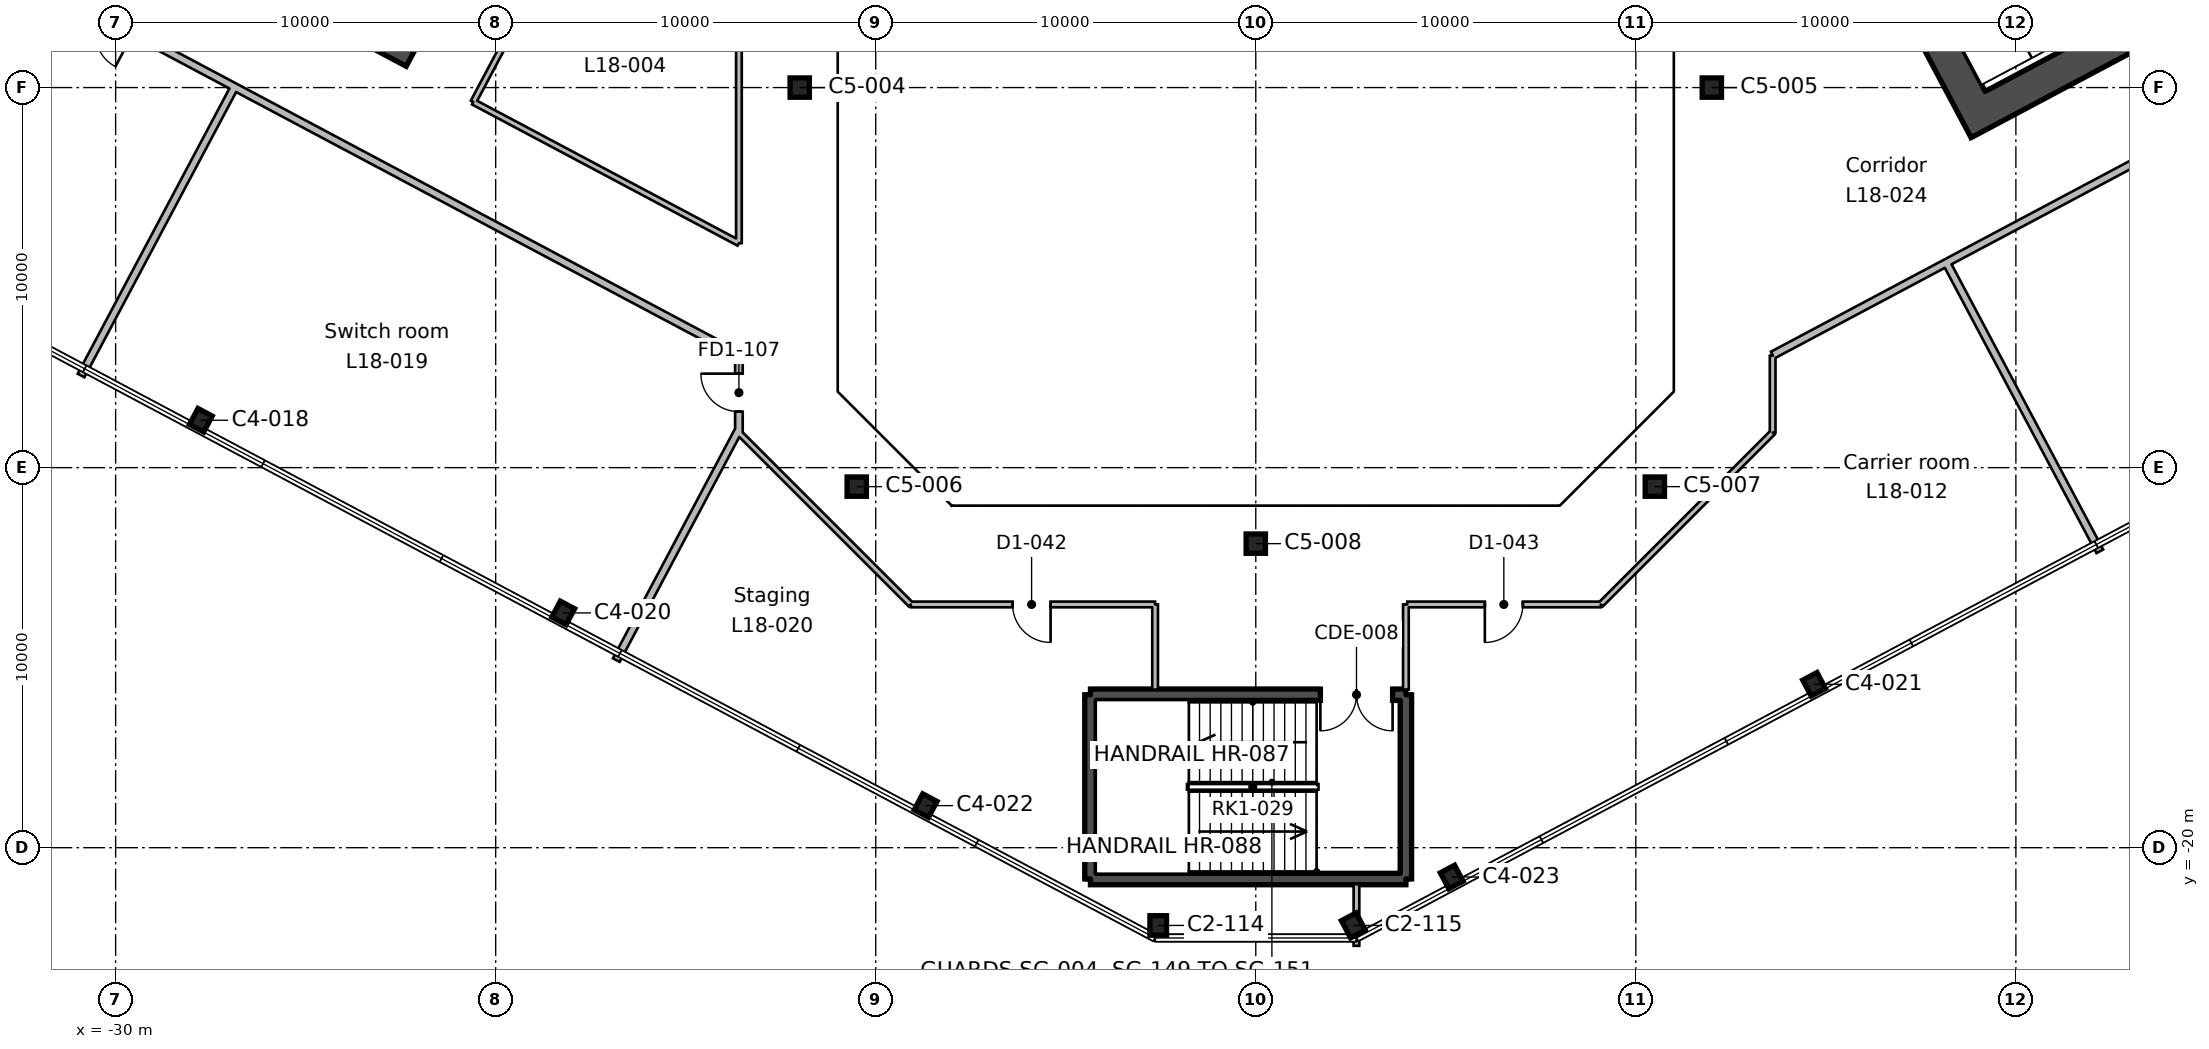
"""IFC4 building model, lengths in metres.
Left out: names, types, materials, properties, quantities, classifications, styles, units other than length and angle.
Written with IfcOpenShell. Run it as: python <this file> out.ifc"""

import sys

from ifc_helpers import new_model, si_unit, direction, frame, frame_2d, origin, origin_2d, place, context, subcontext, project, spatial, rectangle, hollow_rectangle, i_section, extrude, element, fill, save


model = new_model("IFC4")
c1 = context("Model", 3, precision=1e-05, world=origin(), true_north=direction((0.0, 1.0)))
c2 = subcontext(c1, "Body", "Model", "MODEL_VIEW")
j1 = project(units=[si_unit("LENGTHUNIT", "METRE"), si_unit("PLANEANGLEUNIT", "RADIAN")], contexts=[c1])
p1 = place(None, origin())
s1 = spatial("IfcSite", under=j1, at=p1, CompositionType="ELEMENT")
p2 = place(p1, origin())
s2 = spatial("IfcBuilding", under=s1, at=p2, CompositionType="ELEMENT")
p3 = place(p2, frame((0.0, 0.0, 93.8)))
s3 = spatial("IfcBuildingStorey", under=s2, at=p3, CompositionType="ELEMENT", Elevation=93.8)
for number, where, z_axis, x_axis in (
    (1, (-2.567, -22.046, 0.0), (0.0, 0.0, 1.0), (1.0, 0.0, 0.0)),
    (2, (2.567, -22.046, 0.0), (0.0, 0.0, 1.0), (0.883, 0.469, 0.0)),
):
    element("IfcColumn", number, at=place(p3, frame(where, z_axis=z_axis, x_axis=x_axis)), inside=s3, PredefinedType="COLUMN", context=c2, shape_type="SweptSolid", body=[
        extrude(i_section(OverallWidth=0.437, OverallDepth=0.513, WebThickness=0.061, FlangeThickness=0.097, FilletRadius=0.015, at=origin_2d()), origin(), (0.0, 0.0, 1.0), 4.6),
    ])
for number, where, z_axis, x_axis in (
    (3, (5.155, -20.771, 0.0), (0.0, 0.0, 1.0), (0.883, 0.469, 0.0)),
    (4, (-8.687, -18.893, 0.0), (0.0, 0.0, 1.0), (0.883, -0.469, 0.0)),
    (5, (14.691, -15.701, 0.0), (0.0, 0.0, 1.0), (0.883, 0.469, 0.0)),
    (6, (-18.223, -13.823, 0.0), (0.0, 0.0, 1.0), (0.883, -0.469, 0.0)),
):
    element("IfcColumn", number, at=place(p3, frame(where, z_axis=z_axis, x_axis=x_axis)), inside=s3, PredefinedType="COLUMN", context=c2, shape_type="SweptSolid", body=[
        extrude(i_section(OverallWidth=0.424, OverallDepth=0.475, WebThickness=0.048, FlangeThickness=0.077, FilletRadius=0.015, at=origin_2d()), origin(), (0.0, 0.0, 1.0), 4.6),
    ])
for number, where, z_axis, x_axis in (
    (7, (0.0, -12.0, 0.0), (0.0, 0.0, 1.0), (1.0, 0.0, 0.0)),
    (8, (-10.5, -10.5, 0.0), (0.0, 0.0, 1.0), (1.0, 0.0, 0.0)),
    (9, (10.5, -10.5, 0.0), (0.0, 0.0, 1.0), (1.0, 0.0, 0.0)),
):
    element("IfcColumn", number, at=place(p3, frame(where, z_axis=z_axis, x_axis=x_axis)), inside=s3, PredefinedType="COLUMN", context=c2, shape_type="SweptSolid", body=[
        extrude(hollow_rectangle(XDim=0.508, YDim=0.508, WallThickness=0.021, InnerFilletRadius=0.01, OuterFilletRadius=0.031, at=origin_2d()), origin(), (0.0, 0.0, 1.0), 4.6),
    ])
p4 = place(p3, frame((-27.758, -8.753, 0.0), z_axis=(0.0, 0.0, 1.0), x_axis=(0.882947592859, -0.469471562786, 0.0)))
e10 = element("IfcColumn", 10, at=p4, inside=s3, PredefinedType="COLUMN", context=c2, shape_type="SweptSolid", body=[
    extrude(i_section(OverallWidth=0.424, OverallDepth=0.475, WebThickness=0.048, FlangeThickness=0.077, FilletRadius=0.015, at=origin_2d()), origin(), (0.0, 0.0, 1.0), 4.6),
])
for number, where, z_axis, x_axis in (
    (11, (-12.0, 0.0, 0.0), (0.0, 0.0, 1.0), (1.0, 0.0, 0.0)),
    (12, (12.0, 0.0, 0.0), (0.0, 0.0, 1.0), (1.0, 0.0, 0.0)),
):
    element("IfcColumn", number, at=place(p3, frame(where, z_axis=z_axis, x_axis=x_axis)), inside=s3, PredefinedType="COLUMN", context=c2, shape_type="SweptSolid", body=[
        extrude(hollow_rectangle(XDim=0.508, YDim=0.508, WallThickness=0.021, InnerFilletRadius=0.01, OuterFilletRadius=0.031, at=origin_2d()), origin(), (0.0, 0.0, 1.0), 4.6),
    ])
p5 = place(p3, frame((-13.362, 18.43, 0.0), z_axis=(0.0, 0.0, 1.0), x_axis=(-0.46947084998, -0.882947971864, 0.0)))
e13 = element("IfcWall", 13, at=p5, inside=s3, PredefinedType="SHEAR", context=c2, shape_type="SweptSolid", body=[
    extrude(rectangle(XDim=20.0, YDim=0.9, at=frame_2d((10.0, 0.0))), origin(), (0.0, 0.0, 1.0), 4.6),
])
p6 = place(p5, frame((7.0, 0.0, 0.0)))
e14 = element("IfcOpeningElement", 14, at=p6, cuts=e13, PredefinedType="OPENING", context=c2, shape_type="SweptSolid", body=[
    extrude(rectangle(XDim=2.4, YDim=2.4, at=frame_2d((1.2, 1.2))), frame((0.0, 0.46, 0.0), z_axis=(0.0, -1.0, 0.0), x_axis=(1.0, 0.0, 0.0)), (0.0, 0.0, 1.0), 0.92),
])
p7 = place(p3, frame((19.219, -1.107, 0.0), z_axis=(0.0, 0.0, 1.0), x_axis=(-0.46947084998, 0.882947971864, 0.0)))
e15 = element("IfcWall", 15, at=p7, inside=s3, PredefinedType="SHEAR", context=c2, shape_type="SweptSolid", body=[
    extrude(rectangle(XDim=20.0, YDim=0.9, at=frame_2d((10.0, 0.0))), origin(), (0.0, 0.0, 1.0), 4.6),
])
p8 = place(p7, frame((7.0, 0.0, 0.0)))
e16 = element("IfcOpeningElement", 16, at=p8, cuts=e15, PredefinedType="OPENING", context=c2, shape_type="SweptSolid", body=[
    extrude(rectangle(XDim=2.4, YDim=2.4, at=frame_2d((1.2, 1.2))), frame((0.0, 0.46, 0.0), z_axis=(0.0, -1.0, 0.0), x_axis=(1.0, 0.0, 0.0)), (0.0, 0.0, 1.0), 0.92),
])
p9 = place(p3, frame((19.405, -0.498, 0.0), z_axis=(0.0, 0.0, 1.0), x_axis=(0.88294509198, 0.469476266226, 0.0)))
e17 = element("IfcWall", 17, at=p9, inside=s3, PredefinedType="SHEAR", context=c2, shape_type="SweptSolid", body=[
    extrude(rectangle(XDim=20.2, YDim=0.9, at=frame_2d((10.1, 0.0))), origin(), (0.0, 0.0, 1.0), 4.6),
])
p10 = place(p3, frame((3.95, -15.975, 0.0), z_axis=(0.0, 0.0, 1.0), x_axis=(0.0, -1.0, 0.0)))
e18 = element("IfcWall", 18, at=p10, inside=s3, PredefinedType="SHEAR", context=c2, shape_type="SweptSolid", body=[
    extrude(rectangle(XDim=4.85, YDim=0.3, at=frame_2d((2.425, 0.0))), origin(), (0.0, 0.0, 1.0), 4.6),
])
p11 = place(p3, frame((3.95, -20.825, 0.0), z_axis=(0.0, 0.0, 1.0), x_axis=(-1.0, 0.0, 0.0)))
e19 = element("IfcWall", 19, at=p11, inside=s3, PredefinedType="SHEAR", context=c2, shape_type="SweptSolid", body=[
    extrude(rectangle(XDim=8.3, YDim=0.3, at=frame_2d((4.15, 0.0))), origin(), (0.0, 0.0, 1.0), 4.6),
])
p12 = place(p3, frame((-4.35, -20.825, 0.0), z_axis=(0.0, 0.0, 1.0), x_axis=(0.0, 1.0, 0.0)))
e20 = element("IfcWall", 20, at=p12, inside=s3, PredefinedType="SHEAR", context=c2, shape_type="SweptSolid", body=[
    extrude(rectangle(XDim=4.85, YDim=0.3, at=frame_2d((2.425, 0.0))), origin(), (0.0, 0.0, 1.0), 4.6),
])
p13 = place(p3, frame((-4.35, -15.975, 0.0), z_axis=(0.0, 0.0, 1.0), x_axis=(1.0, 0.0, 0.0)))
e21 = element("IfcWall", 21, at=p13, inside=s3, PredefinedType="SHEAR", context=c2, shape_type="SweptSolid", body=[
    extrude(rectangle(XDim=8.3, YDim=0.3, at=frame_2d((4.15, 0.0))), origin(), (0.0, 0.0, 1.0), 4.6),
])
p14 = place(p13, frame((6.05, 0.0, 0.0)))
e22 = element("IfcOpeningElement", 22, at=p14, cuts=e21, PredefinedType="OPENING", context=c2, shape_type="SweptSolid", body=[
    extrude(rectangle(XDim=1.9, YDim=2.1, at=frame_2d((0.95, 1.05))), frame((0.0, 0.16, 0.0), z_axis=(0.0, -1.0, 0.0), x_axis=(1.0, 0.0, 0.0)), (0.0, 0.0, 1.0), 0.32),
])
p15 = place(p3, frame((-26.871, 0.017, 0.0), z_axis=(0.0, 0.0, 1.0), x_axis=(-0.469522575087, -0.882920467247, 0.0)))
e23 = element("IfcWall", 23, at=p15, inside=s3, PredefinedType="PARTITIONING", context=c2, shape_type="SweptSolid", body=[
    extrude(rectangle(XDim=8.6, YDim=0.2, at=frame_2d((4.3, 0.0))), origin(), (0.0, 0.0, 1.0), 4.2),
])
p16 = place(p3, frame((-13.6, -9.077, 0.0), z_axis=(0.0, 0.0, 1.0), x_axis=(0.0, 1.0, 0.0)))
e24 = element("IfcWall", 24, at=p16, inside=s3, PredefinedType="PARTITIONING", context=c2, shape_type="SweptSolid", body=[
    extrude(rectangle(XDim=2.038, YDim=0.2, at=frame_2d((1.019, 0.0))), origin(), (0.0, 0.0, 1.0), 4.2),
])
p17 = place(p16, frame((0.55, 0.0, 0.0)))
e25 = element("IfcOpeningElement", 25, at=p17, cuts=e24, PredefinedType="OPENING", context=c2, shape_type="SweptSolid", body=[
    extrude(rectangle(XDim=1.0, YDim=2.1, at=frame_2d((0.5, 1.05))), frame((0.0, 0.11, 0.0), z_axis=(0.0, -1.0, 0.0), x_axis=(1.0, 0.0, 0.0)), (0.0, 0.0, 1.0), 0.22),
])
p18 = place(p3, frame((-13.6, -7.039, 0.0), z_axis=(0.0, 0.0, 1.0), x_axis=(-0.882948807105, 0.469469279113, 0.0)))
e26 = element("IfcWall", 26, at=p18, inside=s3, PredefinedType="PARTITIONING", context=c2, shape_type="SweptSolid", body=[
    extrude(rectangle(XDim=36.999, YDim=0.2, at=frame_2d((18.499, 0.0))), origin(), (0.0, 0.0, 1.0), 4.2),
])
p19 = place(p18, frame((18.05, 0.0, 0.0)))
e27 = element("IfcOpeningElement", 27, at=p19, cuts=e26, PredefinedType="OPENING", context=c2, shape_type="SweptSolid", body=[
    extrude(rectangle(XDim=1.0, YDim=2.1, at=frame_2d((0.5, 1.05))), frame((0.0, 0.11, 0.0), z_axis=(0.0, -1.0, 0.0), x_axis=(1.0, 0.0, 0.0)), (0.0, 0.0, 1.0), 0.22),
])
p20 = place(p3, frame((-13.6, -8.998, 0.0), z_axis=(0.0, 0.0, 1.0), x_axis=(-0.469531053644, -0.882915958438, 0.0)))
e28 = element("IfcWall", 28, at=p20, inside=s3, PredefinedType="PARTITIONING", context=c2, shape_type="SweptSolid", body=[
    extrude(rectangle(XDim=6.87, YDim=0.2, at=frame_2d((3.435, 0.0))), origin(), (0.0, 0.0, 1.0), 4.2),
])
p21 = place(p3, frame((-13.6, -9.077, 0.0), z_axis=(0.0, 0.0, 1.0), x_axis=(0.707106781187, -0.707106781187, 0.0)))
e29 = element("IfcWall", 29, at=p21, inside=s3, PredefinedType="PARTITIONING", context=c2, shape_type="SweptSolid", body=[
    extrude(rectangle(XDim=6.397, YDim=0.15, at=frame_2d((3.198, 0.0))), origin(), (0.0, 0.0, 1.0), 4.2),
])
p22 = place(p3, frame((-2.649, -15.84, 0.0), z_axis=(0.0, 0.0, 1.0), x_axis=(0.0, 1.0, 0.0)))
e30 = element("IfcWall", 30, at=p22, inside=s3, PredefinedType="PARTITIONING", context=c2, shape_type="SweptSolid", body=[
    extrude(rectangle(XDim=2.24, YDim=0.15, at=frame_2d((1.12, 0.0))), origin(), (0.0, 0.0, 1.0), 4.2),
])
p23 = place(p3, frame((-2.649, -13.6, 0.0), z_axis=(0.0, 0.0, 1.0), x_axis=(-1.0, 0.0, 0.0)))
e31 = element("IfcWall", 31, at=p23, inside=s3, PredefinedType="PARTITIONING", context=c2, shape_type="SweptSolid", body=[
    extrude(rectangle(XDim=6.428, YDim=0.15, at=frame_2d((3.214, 0.0))), origin(), (0.0, 0.0, 1.0), 4.2),
])
p24 = place(p23, frame((2.75, 0.0, 0.0)))
e32 = element("IfcOpeningElement", 32, at=p24, cuts=e31, PredefinedType="OPENING", context=c2, shape_type="SweptSolid", body=[
    extrude(rectangle(XDim=1.0, YDim=2.1, at=frame_2d((0.5, 1.05))), frame((0.0, 0.085, 0.0), z_axis=(0.0, -1.0, 0.0), x_axis=(1.0, 0.0, 0.0)), (0.0, 0.0, 1.0), 0.17),
])
p25 = place(p3, frame((2.649, -22.582, 0.0), z_axis=(0.0, 0.0, 1.0), x_axis=(0.0, 1.0, 0.0)))
e33 = element("IfcWall", 33, at=p25, inside=s3, PredefinedType="PARTITIONING", context=c2, shape_type="SweptSolid", body=[
    extrude(rectangle(XDim=1.622, YDim=0.15, at=frame_2d((0.811, 0.0))), origin(), (0.0, 0.0, 1.0), 4.2),
])
p26 = place(p3, frame((3.95, -13.6, 0.0), z_axis=(0.0, 0.0, 1.0), x_axis=(0.0, -1.0, 0.0)))
e34 = element("IfcWall", 34, at=p26, inside=s3, PredefinedType="PARTITIONING", context=c2, shape_type="SweptSolid", body=[
    extrude(rectangle(XDim=2.24, YDim=0.15, at=frame_2d((1.12, 0.0))), origin(), (0.0, 0.0, 1.0), 4.2),
])
p27 = place(p3, frame((13.6, -7.053, 0.0), z_axis=(0.0, 0.0, 1.0), x_axis=(0.0, -1.0, 0.0)))
e35 = element("IfcWall", 35, at=p27, inside=s3, PredefinedType="PARTITIONING", context=c2, shape_type="SweptSolid", body=[
    extrude(rectangle(XDim=2.024, YDim=0.15, at=frame_2d((1.012, 0.0))), origin(), (0.0, 0.0, 1.0), 4.2),
])
p28 = place(p3, frame((13.6, -9.077, 0.0), z_axis=(0.0, 0.0, 1.0), x_axis=(-0.707106781187, -0.707106781187, 0.0)))
e36 = element("IfcWall", 36, at=p28, inside=s3, PredefinedType="PARTITIONING", context=c2, shape_type="SweptSolid", body=[
    extrude(rectangle(XDim=6.397, YDim=0.15, at=frame_2d((3.198, 0.0))), origin(), (0.0, 0.0, 1.0), 4.2),
])
p29 = place(p3, frame((9.077, -13.6, 0.0), z_axis=(0.0, 0.0, 1.0), x_axis=(-1.0, 0.0, 0.0)))
e37 = element("IfcWall", 37, at=p29, inside=s3, PredefinedType="PARTITIONING", context=c2, shape_type="SweptSolid", body=[
    extrude(rectangle(XDim=5.092, YDim=0.15, at=frame_2d((2.546, 0.0))), origin(), (0.0, 0.0, 1.0), 4.2),
])
p30 = place(p29, frame((2.05, 0.0, 0.0)))
e38 = element("IfcOpeningElement", 38, at=p30, cuts=e37, PredefinedType="OPENING", context=c2, shape_type="SweptSolid", body=[
    extrude(rectangle(XDim=1.0, YDim=2.1, at=frame_2d((0.5, 1.05))), frame((0.0, 0.085, 0.0), z_axis=(0.0, -1.0, 0.0), x_axis=(1.0, 0.0, 0.0)), (0.0, 0.0, 1.0), 0.17),
])
p31 = place(p3, frame((18.172, -4.608, 0.0), z_axis=(0.0, 0.0, 1.0), x_axis=(0.469386979633, -0.882992561323, 0.0)))
e39 = element("IfcWall", 39, at=p31, inside=s3, PredefinedType="PARTITIONING", context=c2, shape_type="SweptSolid", body=[
    extrude(rectangle(XDim=8.6, YDim=0.2, at=frame_2d((4.3, 0.0))), origin(), (0.0, 0.0, 1.0), 4.2),
])
p32 = place(p3, frame((57.105, 16.093, 0.0), z_axis=(0.0, 0.0, 1.0), x_axis=(-0.882946553343, -0.469473517827, 0.0)))
e40 = element("IfcWall", 40, at=p32, inside=s3, PredefinedType="PARTITIONING", context=c2, shape_type="SweptSolid", body=[
    extrude(rectangle(XDim=49.272, YDim=0.2, at=frame_2d((24.636, 0.0))), origin(), (0.0, 0.0, 1.0), 4.2),
])
p33 = place(p32, frame((27.75, 0.0, 0.0)))
e41 = element("IfcOpeningElement", 41, at=p33, cuts=e40, PredefinedType="OPENING", context=c2, shape_type="SweptSolid", body=[
    extrude(rectangle(XDim=1.0, YDim=2.1, at=frame_2d((0.5, 1.05))), frame((0.0, 0.11, 0.0), z_axis=(0.0, -1.0, 0.0), x_axis=(1.0, 0.0, 0.0)), (0.0, 0.0, 1.0), 0.22),
])
p34 = place(p32, frame((24.15, 0.0, 0.0)))
e42 = element("IfcOpeningElement", 42, at=p34, cuts=e40, PredefinedType="OPENING", context=c2, shape_type="SweptSolid", body=[
    extrude(rectangle(XDim=1.0, YDim=2.1, at=frame_2d((0.5, 1.05))), frame((0.0, 0.11, 0.0), z_axis=(0.0, -1.0, 0.0), x_axis=(1.0, 0.0, 0.0)), (0.0, 0.0, 1.0), 0.22),
])
p35 = place(p32, frame((9.85, 0.0, 0.0)))
e43 = element("IfcOpeningElement", 43, at=p35, cuts=e40, PredefinedType="OPENING", context=c2, shape_type="SweptSolid", body=[
    extrude(rectangle(XDim=1.0, YDim=2.1, at=frame_2d((0.5, 1.05))), frame((0.0, 0.11, 0.0), z_axis=(0.0, -1.0, 0.0), x_axis=(1.0, 0.0, 0.0)), (0.0, 0.0, 1.0), 0.22),
])
p36 = place(p3, frame((-20.588, -0.379, 0.0), z_axis=(0.0, 0.0, 1.0), x_axis=(0.469489882812, 0.882937851685, 0.0)))
e44 = element("IfcWall", 44, at=p36, inside=s3, PredefinedType="PARTITIONING", context=c2, shape_type="SweptSolid", body=[
    extrude(rectangle(XDim=20.0, YDim=0.15, at=frame_2d((10.0, 0.0))), origin(), (0.0, 0.0, 1.0), 4.2),
])
p37 = place(p36, frame((9.55, 0.0, 0.0)))
e45 = element("IfcOpeningElement", 45, at=p37, cuts=e44, PredefinedType="OPENING", context=c2, shape_type="SweptSolid", body=[
    extrude(rectangle(XDim=1.0, YDim=2.1, at=frame_2d((0.5, 1.05))), frame((0.0, 0.085, 0.0), z_axis=(0.0, -1.0, 0.0), x_axis=(1.0, 0.0, 0.0)), (0.0, 0.0, 1.0), 0.17),
])
p38 = place(p3, frame((-13.6, 9.077, 0.0), z_axis=(0.0, 0.0, 1.0), x_axis=(0.0, -1.0, 0.0)))
e46 = element("IfcWall", 46, at=p38, inside=s3, PredefinedType="PARTITIONING", context=c2, shape_type="SweptSolid", body=[
    extrude(rectangle(XDim=13.171, YDim=0.15, at=frame_2d((6.585, 0.0))), origin(), (0.0, 0.0, 1.0), 4.2),
])
p39 = place(p3, frame((-13.6, -4.094, 0.0), z_axis=(0.0, 0.0, 1.0), x_axis=(-0.882967890474, 0.469433386533, 0.0)))
e47 = element("IfcWall", 47, at=p39, inside=s3, PredefinedType="PARTITIONING", context=c2, shape_type="SweptSolid", body=[
    extrude(rectangle(XDim=7.914, YDim=0.15, at=frame_2d((3.957, 0.0))), origin(), (0.0, 0.0, 1.0), 4.2),
])
p40 = place(p14, frame((1.9, 0.0, 0.0), z_axis=(0.0, 0.0, 1.0), x_axis=(-1.0, 0.0, 0.0)))
e48 = element("IfcDoor", 48, at=p40, inside=s3, OperationType="DOUBLE_DOOR_SINGLE_SWING", PredefinedType="DOOR", context=c2, shape_type="SweptSolid", body=[
    extrude(rectangle(XDim=1.9, YDim=2.1, at=frame_2d((0.95, 1.05))), frame((0.0, 0.025, 0.0), z_axis=(0.0, -1.0, 0.0), x_axis=(1.0, 0.0, 0.0)), (0.0, 0.0, 1.0), 0.05),
])
fill(e22, e48)
p41 = place(p30, origin())
e49 = element("IfcDoor", 49, at=p41, inside=s3, OperationType="SINGLE_SWING_RIGHT", PredefinedType="DOOR", context=c2, shape_type="SweptSolid", body=[
    extrude(rectangle(XDim=1.0, YDim=2.1, at=frame_2d((0.5, 1.05))), frame((0.0, 0.025, 0.0), z_axis=(0.0, -1.0, 0.0), x_axis=(1.0, 0.0, 0.0)), (0.0, 0.0, 1.0), 0.05),
])
fill(e38, e49)
p42 = place(p17, origin())
e50 = element("IfcDoor", 50, at=p42, inside=s3, OperationType="SINGLE_SWING_RIGHT", PredefinedType="DOOR", context=c2, shape_type="SweptSolid", body=[
    extrude(rectangle(XDim=1.0, YDim=2.1, at=frame_2d((0.5, 1.05))), frame((0.0, 0.025, 0.0), z_axis=(0.0, -1.0, 0.0), x_axis=(1.0, 0.0, 0.0)), (0.0, 0.0, 1.0), 0.05),
])
fill(e25, e50)
p43 = place(p24, origin())
e51 = element("IfcDoor", 51, at=p43, inside=s3, OperationType="SINGLE_SWING_LEFT", PredefinedType="DOOR", context=c2, shape_type="SweptSolid", body=[
    extrude(rectangle(XDim=1.0, YDim=2.1, at=frame_2d((0.5, 1.05))), frame((0.0, 0.025, 0.0), z_axis=(0.0, -1.0, 0.0), x_axis=(1.0, 0.0, 0.0)), (0.0, 0.0, 1.0), 0.05),
])
fill(e32, e51)
save(model, sys.argv[1])
